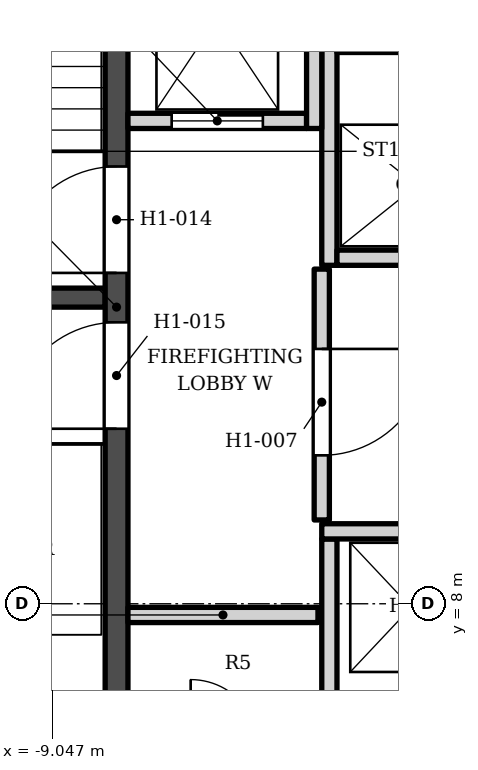
"""IFC4 building model, lengths in metres.
Left out: names, types, materials, properties, quantities, classifications, styles, units other than length and angle.
Written with IfcOpenShell. Run it as: python <this file> out.ifc"""

import sys

from ifc_helpers import new_model, si_unit, direction, frame, frame_2d, origin, place, context, subcontext, project, spatial, rectangle, extrude, element, fill, save


model = new_model("IFC4")
c1 = context("Model", 3, precision=1e-05, world=origin(), true_north=direction((0.0, 1.0)))
c2 = subcontext(c1, "Body", "Model", "MODEL_VIEW")
j1 = project(units=[si_unit("LENGTHUNIT", "METRE"), si_unit("PLANEANGLEUNIT", "RADIAN")], contexts=[c1])
p1 = place(None, origin())
s1 = spatial("IfcSite", under=j1, at=p1, CompositionType="ELEMENT")
p2 = place(p1, origin())
s2 = spatial("IfcBuilding", under=s1, at=p2, CompositionType="ELEMENT")
p3 = place(p2, frame((0.0, 0.0, 46.0)))
s3 = spatial("IfcBuildingStorey", under=s2, at=p3, CompositionType="ELEMENT", Elevation=46.0)
p4 = place(p3, frame((-8.2, 5.253, 0.0), z_axis=(0.0, 0.0, 1.0), x_axis=(0.0, 1.0, 0.0)))
e1 = element("IfcWall", 1, at=p4, inside=s3, PredefinedType="SHEAR", context=c2, shape_type="SweptSolid", body=[
    extrude(rectangle(XDim=13.3, YDim=0.3, at=frame_2d((6.65, 0.0))), origin(), (0.0, 0.0, 1.0), 3.4),
])
p5 = place(p4, frame((7.1, 0.0, 0.0)))
e2 = element("IfcOpeningElement", 2, at=p5, cuts=e1, PredefinedType="OPENING", context=c2, shape_type="SweptSolid", body=[
    extrude(rectangle(XDim=1.4, YDim=2.1, at=frame_2d((0.7, 1.05))), frame((0.0, 0.16, 0.0), z_axis=(0.0, -1.0, 0.0), x_axis=(1.0, 0.0, 0.0)), (0.0, 0.0, 1.0), 0.32),
])
p6 = place(p4, frame((5.05, 0.0, 0.0)))
e3 = element("IfcOpeningElement", 3, at=p6, cuts=e1, PredefinedType="OPENING", context=c2, shape_type="SweptSolid", body=[
    extrude(rectangle(XDim=1.4, YDim=2.1, at=frame_2d((0.7, 1.05))), frame((0.0, 0.16, 0.0), z_axis=(0.0, -1.0, 0.0), x_axis=(1.0, 0.0, 0.0)), (0.0, 0.0, 1.0), 0.32),
])
p7 = place(p3, frame((-12.1, 12.028, 0.0), z_axis=(0.0, 0.0, 1.0), x_axis=(1.0, 0.0, 0.0)))
e4 = element("IfcWall", 4, at=p7, inside=s3, PredefinedType="SHEAR", context=c2, shape_type="SweptSolid", body=[
    extrude(rectangle(XDim=3.75, YDim=0.25, at=frame_2d((1.875, 0.0))), origin(), (0.0, 0.0, 1.0), 3.4),
])
for number, where, z_axis, x_axis in (
    (5, (-5.4, 6.353, 0.0), (0.0, 0.0, 1.0), (0.0, 1.0, 0.0)),
    (6, (-8.05, 7.853, 0.0), (0.0, 0.0, 1.0), (1.0, 0.0, 0.0)),
):
    element("IfcWall", number, at=place(p3, frame(where, z_axis=z_axis, x_axis=x_axis)), inside=s3, PredefinedType="SOLIDWALL", context=c2, shape_type="SweptSolid", body=[
        extrude(rectangle(XDim=2.5, YDim=0.2, at=frame_2d((1.25, 0.0))), origin(), (0.0, 0.0, 1.0), 3.23),
    ])
p8 = place(p3, frame((-5.5, 8.953, 0.0), z_axis=(0.0, 0.0, 1.0), x_axis=(1.0, 0.0, 0.0)))
e7 = element("IfcWall", 7, at=p8, inside=s3, PredefinedType="SOLIDWALL", context=c2, shape_type="SweptSolid", body=[
    extrude(rectangle(XDim=4.5, YDim=0.2, at=frame_2d((2.25, 0.0))), origin(), (0.0, 0.0, 1.0), 3.23),
])
p9 = place(p3, frame((-5.5, 9.103, 0.0), z_axis=(0.0, 0.0, 1.0), x_axis=(0.0, 1.0, 0.0)))
e8 = element("IfcWall", 8, at=p9, inside=s3, PredefinedType="SOLIDWALL", context=c2, shape_type="SweptSolid", body=[
    extrude(rectangle(XDim=3.3, YDim=0.2, at=frame_2d((1.65, 0.0))), origin(), (0.0, 0.0, 1.0), 3.23),
])
p10 = place(p9, frame((0.85, 0.0, 0.0)))
e9 = element("IfcOpeningElement", 9, at=p10, cuts=e8, PredefinedType="OPENING", context=c2, shape_type="SweptSolid", body=[
    extrude(rectangle(XDim=1.4, YDim=2.1, at=frame_2d((0.7, 1.05))), frame((0.0, 0.11, 0.0), z_axis=(0.0, -1.0, 0.0), x_axis=(1.0, 0.0, 0.0)), (0.0, 0.0, 1.0), 0.22),
])
p11 = place(p3, frame((-5.4, 12.453, 0.0), z_axis=(0.0, 0.0, 1.0), x_axis=(0.0, 1.0, 0.0)))
e10 = element("IfcWall", 10, at=p11, inside=s3, PredefinedType="SOLIDWALL", context=c2, shape_type="SweptSolid", body=[
    extrude(rectangle(XDim=3.0, YDim=0.2, at=frame_2d((1.5, 0.0))), origin(), (0.0, 0.0, 1.0), 3.23),
])
p12 = place(p3, frame((-5.3, 12.552, 0.0), z_axis=(0.0, 0.0, 1.0), x_axis=(1.0, 0.0, 0.0)))
e11 = element("IfcWall", 11, at=p12, inside=s3, PredefinedType="SOLIDWALL", context=c2, shape_type="SweptSolid", body=[
    extrude(rectangle(XDim=2.1, YDim=0.2, at=frame_2d((1.05, 0.0))), origin(), (0.0, 0.0, 1.0), 3.23),
])
p13 = place(p3, frame((-8.05, 14.353, 0.0), z_axis=(0.0, 0.0, 1.0), x_axis=(1.0, 0.0, 0.0)))
e12 = element("IfcWall", 12, at=p13, inside=s3, PredefinedType="SOLIDWALL", context=c2, shape_type="SweptSolid", body=[
    extrude(rectangle(XDim=2.35, YDim=0.2, at=frame_2d((1.175, 0.0))), origin(), (0.0, 0.0, 1.0), 3.23),
])
p14 = place(p13, frame((0.575, 0.0, 0.0)))
e13 = element("IfcOpeningElement", 13, at=p14, cuts=e12, PredefinedType="OPENING", context=c2, shape_type="SweptSolid", body=[
    extrude(rectangle(XDim=1.2, YDim=2.1, at=frame_2d((0.6, 1.05))), frame((0.0, 0.11, 0.0), z_axis=(0.0, -1.0, 0.0), x_axis=(1.0, 0.0, 0.0)), (0.0, 0.0, 1.0), 0.22),
])
p15 = place(p3, frame((-5.6, 14.253, 0.0), z_axis=(0.0, 0.0, 1.0), x_axis=(0.0, 1.0, 0.0)))
e14 = element("IfcWall", 14, at=p15, inside=s3, PredefinedType="SOLIDWALL", context=c2, shape_type="SweptSolid", body=[
    extrude(rectangle(XDim=4.3, YDim=0.2, at=frame_2d((2.15, 0.0))), origin(), (0.0, 0.0, 1.0), 3.23),
])
p16 = place(p3, frame((-5.3, 15.353, 0.0), z_axis=(0.0, 0.0, 1.0), x_axis=(1.0, 0.0, 0.0)))
e15 = element("IfcWall", 15, at=p16, inside=s3, PredefinedType="SOLIDWALL", context=c2, shape_type="SweptSolid", body=[
    extrude(rectangle(XDim=2.1, YDim=0.2, at=frame_2d((1.05, 0.0))), origin(), (0.0, 0.0, 1.0), 3.23),
])
p17 = place(p14, origin())
e16 = element("IfcDoor", 16, at=p17, inside=s3, OperationType="DOUBLE_DOOR_SLIDING", PredefinedType="DOOR", context=c2, shape_type="SweptSolid", body=[
    extrude(rectangle(XDim=1.2, YDim=2.1, at=frame_2d((0.6, 1.05))), frame((0.0, 0.025, 0.0), z_axis=(0.0, -1.0, 0.0), x_axis=(1.0, 0.0, 0.0)), (0.0, 0.0, 1.0), 0.05),
])
fill(e13, e16)
p18 = place(p5, origin())
e17 = element("IfcDoor", 17, at=p18, inside=s3, OperationType="SINGLE_SWING_LEFT", PredefinedType="DOOR", context=c2, shape_type="SweptSolid", body=[
    extrude(rectangle(XDim=1.4, YDim=2.1, at=frame_2d((0.7, 1.05))), frame((0.0, 0.025, 0.0), z_axis=(0.0, -1.0, 0.0), x_axis=(1.0, 0.0, 0.0)), (0.0, 0.0, 1.0), 0.05),
])
fill(e2, e17)
p19 = place(p6, origin())
e18 = element("IfcDoor", 18, at=p19, inside=s3, OperationType="SINGLE_SWING_LEFT", PredefinedType="DOOR", context=c2, shape_type="SweptSolid", body=[
    extrude(rectangle(XDim=1.4, YDim=2.1, at=frame_2d((0.7, 1.05))), frame((0.0, 0.025, 0.0), z_axis=(0.0, -1.0, 0.0), x_axis=(1.0, 0.0, 0.0)), (0.0, 0.0, 1.0), 0.05),
])
fill(e3, e18)
p20 = place(p10, origin())
e19 = element("IfcDoor", 19, at=p20, inside=s3, OperationType="SINGLE_SWING_RIGHT", PredefinedType="DOOR", context=c2, shape_type="SweptSolid", body=[
    extrude(rectangle(XDim=1.4, YDim=2.1, at=frame_2d((0.7, 1.05))), frame((0.0, 0.025, 0.0), z_axis=(0.0, -1.0, 0.0), x_axis=(1.0, 0.0, 0.0)), (0.0, 0.0, 1.0), 0.05),
])
fill(e9, e19)
save(model, sys.argv[1])
